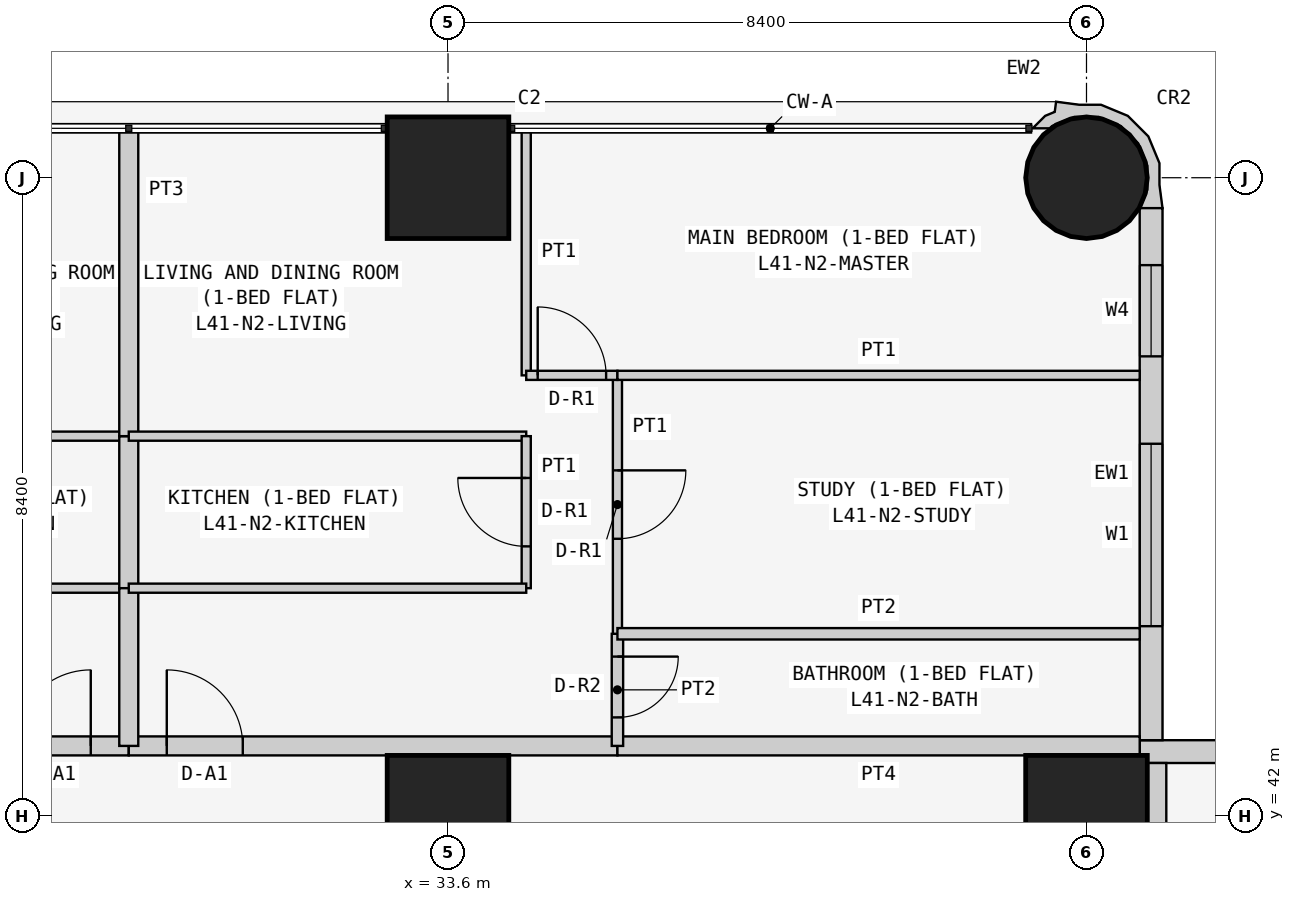
"""IFC4 building model, lengths in metres.
Left out: names, types, materials, properties, quantities, classifications, styles, units other than length and angle.
Written with IfcOpenShell. Run it as: python <this file> out.ifc"""

import sys

from ifc_helpers import new_model, si_unit, direction, frame, frame_2d, origin, origin_2d, place, context, subcontext, project, spatial, polyline, rectangle, circle, outline, extrude, element, fill, save


model = new_model("IFC4")
c1 = context("Model", 3, precision=1e-05, world=origin(), true_north=direction((0.0, 1.0)))
c2 = subcontext(c1, "Body", "Model", "MODEL_VIEW")
j1 = project(units=[si_unit("LENGTHUNIT", "METRE"), si_unit("PLANEANGLEUNIT", "RADIAN")], contexts=[c1])
p1 = place(None, origin())
s1 = spatial("IfcSite", under=j1, at=p1, CompositionType="ELEMENT")
p2 = place(p1, origin())
s2 = spatial("IfcBuilding", under=s1, at=p2, CompositionType="ELEMENT")
p3 = place(p2, frame((0.0, 0.0, 159.3)))
s3 = spatial("IfcBuildingStorey", under=s2, at=p3, CompositionType="ELEMENT", Elevation=159.3)
for number, where, z_axis, x_axis in (
    (1, (33.6, 42.0, 0.0), (0.0, 0.0, 1.0), (1.0, 0.0, 0.0)),
    (2, (33.6, 50.4, 0.0), (0.0, 0.0, 1.0), (1.0, 0.0, 0.0)),
    (3, (42.0, 42.0, 0.0), (0.0, 0.0, 1.0), (1.0, 0.0, 0.0)),
):
    element("IfcColumn", number, at=place(p3, frame(where, z_axis=z_axis, x_axis=x_axis)), inside=s3, PredefinedType="COLUMN", context=c2, shape_type="SweptSolid", body=[
        extrude(rectangle(XDim=1.6, YDim=1.6, at=origin_2d()), origin(), (0.0, 0.0, 1.0), 3.6),
    ])
p4 = place(p3, frame((42.0, 50.4, 0.0), z_axis=(0.0, 0.0, 1.0), x_axis=(1.0, 0.0, 0.0)))
e4 = element("IfcColumn", 4, at=p4, inside=s3, PredefinedType="COLUMN", context=c2, shape_type="SweptSolid", body=[
    extrude(circle(Radius=0.8, at=origin_2d()), origin(), (0.0, 0.0, 1.0), 3.6),
])
p5 = place(p3, frame((58.4, 42.85, 0.0), z_axis=(0.0, 0.0, 1.0), x_axis=(-1.0, 0.0, 0.0)))
e5 = element("IfcWall", 5, at=p5, inside=s3, PredefinedType="SOLIDWALL", context=c2, shape_type="SweptSolid", body=[
    extrude(rectangle(XDim=15.7, YDim=0.3, at=frame_2d((7.85, 0.0))), origin(), (0.0, 0.0, 1.0), 3.45),
])
p6 = place(p5, frame((12.4, 0.0, 0.9)))
e6 = element("IfcOpeningElement", 6, at=p6, cuts=e5, PredefinedType="OPENING", context=c2, shape_type="SweptSolid", body=[
    extrude(rectangle(XDim=1.8, YDim=1.5, at=frame_2d((0.9, 0.75))), frame((0.0, 0.16, 0.0), z_axis=(0.0, -1.0, 0.0), x_axis=(1.0, 0.0, 0.0)), (0.0, 0.0, 1.0), 0.32),
])
p7 = place(p5, frame((9.55, 0.0, 1.5)))
e7 = element("IfcOpeningElement", 7, at=p7, cuts=e5, PredefinedType="OPENING", context=c2, shape_type="SweptSolid", body=[
    extrude(rectangle(XDim=0.9, YDim=0.7, at=frame_2d((0.45, 0.35))), frame((0.0, 0.16, 0.0), z_axis=(0.0, -1.0, 0.0), x_axis=(1.0, 0.0, 0.0)), (0.0, 0.0, 1.0), 0.32),
])
p8 = place(p5, frame((5.1, 0.0, 0.9)))
e8 = element("IfcOpeningElement", 8, at=p8, cuts=e5, PredefinedType="OPENING", context=c2, shape_type="SweptSolid", body=[
    extrude(rectangle(XDim=1.8, YDim=1.5, at=frame_2d((0.9, 0.75))), frame((0.0, 0.16, 0.0), z_axis=(0.0, -1.0, 0.0), x_axis=(1.0, 0.0, 0.0)), (0.0, 0.0, 1.0), 0.32),
])
p9 = place(p5, frame((2.0, 0.0, 0.0)))
e9 = element("IfcOpeningElement", 9, at=p9, cuts=e5, PredefinedType="OPENING", context=c2, shape_type="SweptSolid", body=[
    extrude(rectangle(XDim=0.9, YDim=2.4, at=frame_2d((0.45, 1.2))), frame((0.0, 0.16, 0.0), z_axis=(0.0, -1.0, 0.0), x_axis=(1.0, 0.0, 0.0)), (0.0, 0.0, 1.0), 0.32),
])
p10 = place(p5, frame((0.7, 0.0, 0.9)))
e10 = element("IfcOpeningElement", 10, at=p10, cuts=e5, PredefinedType="OPENING", context=c2, shape_type="SweptSolid", body=[
    extrude(rectangle(XDim=1.2, YDim=1.5, at=frame_2d((0.6, 0.75))), frame((0.0, 0.16, 0.0), z_axis=(0.0, -1.0, 0.0), x_axis=(1.0, 0.0, 0.0)), (0.0, 0.0, 1.0), 0.32),
])
p11 = place(p3, frame((42.85, 43.0, 0.0), z_axis=(0.0, 0.0, 1.0), x_axis=(0.0, 1.0, 0.0)))
e11 = element("IfcWall", 11, at=p11, inside=s3, PredefinedType="SOLIDWALL", context=c2, shape_type="SweptSolid", body=[
    extrude(rectangle(XDim=7.0, YDim=0.3, at=frame_2d((3.5, 0.0))), origin(), (0.0, 0.0, 1.0), 3.45),
])
p12 = place(p11, frame((1.5, 0.0, 0.9)))
e12 = element("IfcOpeningElement", 12, at=p12, cuts=e11, PredefinedType="OPENING", context=c2, shape_type="SweptSolid", body=[
    extrude(rectangle(XDim=2.4, YDim=1.5, at=frame_2d((1.2, 0.75))), frame((0.0, 0.16, 0.0), z_axis=(0.0, -1.0, 0.0), x_axis=(1.0, 0.0, 0.0)), (0.0, 0.0, 1.0), 0.32),
])
p13 = place(p11, frame((5.05, 0.0, 0.9)))
e13 = element("IfcOpeningElement", 13, at=p13, cuts=e11, PredefinedType="OPENING", context=c2, shape_type="SweptSolid", body=[
    extrude(rectangle(XDim=1.2, YDim=1.5, at=frame_2d((0.6, 0.75))), frame((0.0, 0.16, 0.0), z_axis=(0.0, -1.0, 0.0), x_axis=(1.0, 0.0, 0.0)), (0.0, 0.0, 1.0), 0.32),
])
p14 = place(p3, frame((42.817, 50.073, 0.0), z_axis=(0.0, 0.0, 1.0), x_axis=(0.343276641956, 0.93923434088, 0.0)))
e14 = element("IfcWall", 14, at=p14, inside=s3, PredefinedType="SOLIDWALL", context=c2, shape_type="SweptSolid", body=[
    extrude(outline(polyline([(0.266, -0.055), (0.535, 0.044), (0.817, 0.302), (0.978, 0.648), (0.994, 1.03), (0.895, 1.3), (0.828, 1.598), (0.697, 1.569), (0.604, 1.67), (0.394, 1.767), (0.471, 1.556), (0.509, 1.539), (0.724, 1.304), (0.833, 1.005), (0.82, 0.687), (0.686, 0.397), (0.451, 0.182), (0.152, 0.073), (-0.116, 0.084), (-0.128, 0.078), (-0.146, 0.071), (-0.006, -0.197), (0.266, -0.055)])), origin(), (0.0, 0.0, 1.0), 3.45),
])
p15 = place(p3, frame((22.971, 42.925, 0.0), z_axis=(0.0, 0.0, 1.0), x_axis=(1.0, 0.0, 0.0)))
e15 = element("IfcWall", 15, at=p15, inside=s3, PredefinedType="PARTITIONING", context=c2, shape_type="SweptSolid", body=[
    extrude(rectangle(XDim=6.429, YDim=0.25, at=frame_2d((3.214, 0.0))), origin(), (0.0, 0.0, 1.0), 3.45),
])
p16 = place(p15, frame((4.929, 0.0, 0.0)))
e16 = element("IfcOpeningElement", 16, at=p16, cuts=e15, PredefinedType="OPENING", context=c2, shape_type="SweptSolid", body=[
    extrude(rectangle(XDim=1.0, YDim=2.1, at=frame_2d((0.5, 1.05))), frame((0.0, 0.135, 0.0), z_axis=(0.0, -1.0, 0.0), x_axis=(1.0, 0.0, 0.0)), (0.0, 0.0, 1.0), 0.27),
])
p17 = place(p3, frame((29.4, 42.925, 0.0), z_axis=(0.0, 0.0, 1.0), x_axis=(1.0, 0.0, 0.0)))
e17 = element("IfcWall", 17, at=p17, inside=s3, PredefinedType="PARTITIONING", context=c2, shape_type="SweptSolid", body=[
    extrude(rectangle(XDim=6.429, YDim=0.25, at=frame_2d((3.215, 0.0))), origin(), (0.0, 0.0, 1.0), 3.45),
])
p18 = place(p17, frame((0.5, 0.0, 0.0)))
e18 = element("IfcOpeningElement", 18, at=p18, cuts=e17, PredefinedType="OPENING", context=c2, shape_type="SweptSolid", body=[
    extrude(rectangle(XDim=1.0, YDim=2.1, at=frame_2d((0.5, 1.05))), frame((0.0, 0.135, 0.0), z_axis=(0.0, -1.0, 0.0), x_axis=(1.0, 0.0, 0.0)), (0.0, 0.0, 1.0), 0.27),
])
p19 = place(p3, frame((35.829, 42.925, 0.0), z_axis=(0.0, 0.0, 1.0), x_axis=(1.0, 0.0, 0.0)))
e19 = element("IfcWall", 19, at=p19, inside=s3, PredefinedType="PARTITIONING", context=c2, shape_type="SweptSolid", body=[
    extrude(rectangle(XDim=6.871, YDim=0.25, at=frame_2d((3.436, 0.0))), origin(), (0.0, 0.0, 1.0), 3.45),
])
p20 = place(p3, frame((42.925, 42.7, 0.0), z_axis=(0.0, 0.0, 1.0), x_axis=(0.0, -1.0, 0.0)))
e20 = element("IfcWall", 20, at=p20, inside=s3, PredefinedType="PARTITIONING", context=c2, shape_type="SweptSolid", body=[
    extrude(rectangle(XDim=6.471, YDim=0.25, at=frame_2d((3.235, 0.0))), origin(), (0.0, 0.0, 1.0), 3.45),
])
for number, where, z_axis, x_axis in (
    (21, (29.4, 47.0, 0.0), (0.0, 0.0, 1.0), (-1.0, 0.0, 0.0)),
    (22, (24.171, 45.0, 0.0), (0.0, 0.0, 1.0), (1.0, 0.0, 0.0)),
):
    element("IfcWall", number, at=place(p3, frame(where, z_axis=z_axis, x_axis=x_axis)), inside=s3, PredefinedType="PARTITIONING", context=c2, shape_type="SweptSolid", body=[
        extrude(rectangle(XDim=5.229, YDim=0.12, at=frame_2d((2.615, 0.0))), origin(), (0.0, 0.0, 1.0), 3.45),
    ])
p21 = place(p3, frame((29.4, 45.0, 0.0), z_axis=(0.0, 0.0, 1.0), x_axis=(0.0, 1.0, 0.0)))
e23 = element("IfcWall", 23, at=p21, inside=s3, PredefinedType="PARTITIONING", context=c2, shape_type="SweptSolid", body=[
    extrude(rectangle(XDim=2.0, YDim=0.25, at=frame_2d((1.0, 0.0))), origin(), (0.0, 0.0, 1.0), 2.848),
])
p22 = place(p3, frame((29.4, 45.0, 0.0), z_axis=(0.0, 0.0, 1.0), x_axis=(0.0, -1.0, 0.0)))
e24 = element("IfcWall", 24, at=p22, inside=s3, PredefinedType="PARTITIONING", context=c2, shape_type="SweptSolid", body=[
    extrude(rectangle(XDim=2.075, YDim=0.25, at=frame_2d((1.038, 0.0))), origin(), (0.0, 0.0, 1.0), 2.848),
])
p23 = place(p3, frame((29.4, 51.05, 0.0), z_axis=(0.0, 0.0, 1.0), x_axis=(0.0, -1.0, 0.0)))
e25 = element("IfcWall", 25, at=p23, inside=s3, PredefinedType="PARTITIONING", context=c2, shape_type="SweptSolid", body=[
    extrude(rectangle(XDim=4.05, YDim=0.25, at=frame_2d((2.025, 0.0))), origin(), (0.0, 0.0, 1.0), 2.848),
])
p24 = place(p3, frame((29.4, 47.0, 0.0), z_axis=(0.0, 0.0, 1.0), x_axis=(1.0, 0.0, 0.0)))
e26 = element("IfcWall", 26, at=p24, inside=s3, PredefinedType="PARTITIONING", context=c2, shape_type="SweptSolid", body=[
    extrude(rectangle(XDim=5.229, YDim=0.12, at=frame_2d((2.615, 0.0))), origin(), (0.0, 0.0, 1.0), 3.45),
])
p25 = place(p3, frame((34.629, 47.0, 0.0), z_axis=(0.0, 0.0, 1.0), x_axis=(0.0, -1.0, 0.0)))
e27 = element("IfcWall", 27, at=p25, inside=s3, PredefinedType="PARTITIONING", context=c2, shape_type="SweptSolid", body=[
    extrude(rectangle(XDim=2.0, YDim=0.12, at=frame_2d((1.0, 0.0))), origin(), (0.0, 0.0, 1.0), 3.45),
])
p26 = place(p25, frame((0.55, 0.0, 0.0)))
e28 = element("IfcOpeningElement", 28, at=p26, cuts=e27, PredefinedType="OPENING", context=c2, shape_type="SweptSolid", body=[
    extrude(rectangle(XDim=0.9, YDim=2.1, at=frame_2d((0.45, 1.05))), frame((0.0, 0.07, 0.0), z_axis=(0.0, -1.0, 0.0), x_axis=(1.0, 0.0, 0.0)), (0.0, 0.0, 1.0), 0.14),
])
p27 = place(p3, frame((34.629, 45.0, 0.0), z_axis=(0.0, 0.0, 1.0), x_axis=(-1.0, 0.0, 0.0)))
e29 = element("IfcWall", 29, at=p27, inside=s3, PredefinedType="PARTITIONING", context=c2, shape_type="SweptSolid", body=[
    extrude(rectangle(XDim=5.229, YDim=0.12, at=frame_2d((2.615, 0.0))), origin(), (0.0, 0.0, 1.0), 3.45),
])
p28 = place(p3, frame((35.829, 44.4, 0.0), z_axis=(0.0, 0.0, 1.0), x_axis=(0.0, -1.0, 0.0)))
e30 = element("IfcWall", 30, at=p28, inside=s3, PredefinedType="PARTITIONING", context=c2, shape_type="SweptSolid", body=[
    extrude(rectangle(XDim=1.475, YDim=0.15, at=frame_2d((0.737, 0.0))), origin(), (0.0, 0.0, 1.0), 3.45),
])
p29 = place(p28, frame((0.3, 0.0, 0.0)))
e31 = element("IfcOpeningElement", 31, at=p29, cuts=e30, PredefinedType="OPENING", context=c2, shape_type="SweptSolid", body=[
    extrude(rectangle(XDim=0.8, YDim=2.1, at=frame_2d((0.4, 1.05))), frame((0.0, 0.085, 0.0), z_axis=(0.0, -1.0, 0.0), x_axis=(1.0, 0.0, 0.0)), (0.0, 0.0, 1.0), 0.17),
])
p30 = place(p3, frame((35.829, 47.8, 0.0), z_axis=(0.0, 0.0, 1.0), x_axis=(0.0, -1.0, 0.0)))
e32 = element("IfcWall", 32, at=p30, inside=s3, PredefinedType="PARTITIONING", context=c2, shape_type="SweptSolid", body=[
    extrude(rectangle(XDim=3.4, YDim=0.12, at=frame_2d((1.7, 0.0))), origin(), (0.0, 0.0, 1.0), 3.45),
])
p31 = place(p30, frame((1.25, 0.0, 0.0)))
e33 = element("IfcOpeningElement", 33, at=p31, cuts=e32, PredefinedType="OPENING", context=c2, shape_type="SweptSolid", body=[
    extrude(rectangle(XDim=0.9, YDim=2.1, at=frame_2d((0.45, 1.05))), frame((0.0, 0.07, 0.0), z_axis=(0.0, -1.0, 0.0), x_axis=(1.0, 0.0, 0.0)), (0.0, 0.0, 1.0), 0.14),
])
p32 = place(p3, frame((34.629, 51.05, 0.0), z_axis=(0.0, 0.0, 1.0), x_axis=(0.0, -1.0, 0.0)))
e34 = element("IfcWall", 34, at=p32, inside=s3, PredefinedType="PARTITIONING", context=c2, shape_type="SweptSolid", body=[
    extrude(rectangle(XDim=3.25, YDim=0.12, at=frame_2d((1.625, 0.0))), origin(), (0.0, 0.0, 1.0), 3.45),
])
p33 = place(p3, frame((34.629, 47.8, 0.0), z_axis=(0.0, 0.0, 1.0), x_axis=(1.0, 0.0, 0.0)))
e35 = element("IfcWall", 35, at=p33, inside=s3, PredefinedType="PARTITIONING", context=c2, shape_type="SweptSolid", body=[
    extrude(rectangle(XDim=1.2, YDim=0.12, at=frame_2d((0.6, 0.0))), origin(), (0.0, 0.0, 1.0), 3.45),
])
p34 = place(p33, frame((0.151, 0.0, 0.0)))
e36 = element("IfcOpeningElement", 36, at=p34, cuts=e35, PredefinedType="OPENING", context=c2, shape_type="SweptSolid", body=[
    extrude(rectangle(XDim=0.9, YDim=2.1, at=frame_2d((0.45, 1.05))), frame((0.0, 0.07, 0.0), z_axis=(0.0, -1.0, 0.0), x_axis=(1.0, 0.0, 0.0)), (0.0, 0.0, 1.0), 0.14),
])
p35 = place(p3, frame((35.829, 44.4, 0.0), z_axis=(0.0, 0.0, 1.0), x_axis=(1.0, 0.0, 0.0)))
e37 = element("IfcWall", 37, at=p35, inside=s3, PredefinedType="PARTITIONING", context=c2, shape_type="SweptSolid", body=[
    extrude(rectangle(XDim=6.871, YDim=0.15, at=frame_2d((3.436, 0.0))), origin(), (0.0, 0.0, 1.0), 3.45),
])
p36 = place(p3, frame((35.829, 47.8, 0.0), z_axis=(0.0, 0.0, 1.0), x_axis=(1.0, 0.0, 0.0)))
e38 = element("IfcWall", 38, at=p36, inside=s3, PredefinedType="PARTITIONING", context=c2, shape_type="SweptSolid", body=[
    extrude(rectangle(XDim=6.871, YDim=0.12, at=frame_2d((3.436, 0.0))), origin(), (0.0, 0.0, 1.0), 3.45),
])
p37 = place(p12, origin())
e39 = element("IfcWindow", 39, at=p37, inside=s3, PartitioningType="SINGLE_PANEL", PredefinedType="WINDOW", context=c2, shape_type="SweptSolid", body=[
    extrude(rectangle(XDim=2.4, YDim=1.5, at=frame_2d((1.2, 0.75))), frame((0.0, 0.03, 0.0), z_axis=(0.0, -1.0, 0.0), x_axis=(1.0, 0.0, 0.0)), (0.0, 0.0, 1.0), 0.06),
])
fill(e12, e39)
p38 = place(p13, origin())
e40 = element("IfcWindow", 40, at=p38, inside=s3, PartitioningType="SINGLE_PANEL", PredefinedType="WINDOW", context=c2, shape_type="SweptSolid", body=[
    extrude(rectangle(XDim=1.2, YDim=1.5, at=frame_2d((0.6, 0.75))), frame((0.0, 0.03, 0.0), z_axis=(0.0, -1.0, 0.0), x_axis=(1.0, 0.0, 0.0)), (0.0, 0.0, 1.0), 0.06),
])
fill(e13, e40)
p39 = place(p16, origin())
e41 = element("IfcDoor", 41, at=p39, inside=s3, OperationType="SINGLE_SWING_RIGHT", PredefinedType="DOOR", context=c2, shape_type="SweptSolid", body=[
    extrude(rectangle(XDim=1.0, YDim=2.1, at=frame_2d((0.5, 1.05))), frame((0.0, 0.025, 0.0), z_axis=(0.0, -1.0, 0.0), x_axis=(1.0, 0.0, 0.0)), (0.0, 0.0, 1.0), 0.05),
])
fill(e16, e41)
p40 = place(p18, origin())
e42 = element("IfcDoor", 42, at=p40, inside=s3, OperationType="SINGLE_SWING_LEFT", PredefinedType="DOOR", context=c2, shape_type="SweptSolid", body=[
    extrude(rectangle(XDim=1.0, YDim=2.1, at=frame_2d((0.5, 1.05))), frame((0.0, 0.025, 0.0), z_axis=(0.0, -1.0, 0.0), x_axis=(1.0, 0.0, 0.0)), (0.0, 0.0, 1.0), 0.05),
])
fill(e18, e42)
p41 = place(p26, frame((0.9, 0.0, 0.0), z_axis=(0.0, 0.0, 1.0), x_axis=(-1.0, 0.0, 0.0)))
e43 = element("IfcDoor", 43, at=p41, inside=s3, OperationType="SINGLE_SWING_RIGHT", PredefinedType="DOOR", context=c2, shape_type="SweptSolid", body=[
    extrude(rectangle(XDim=0.9, YDim=2.1, at=frame_2d((0.45, 1.05))), frame((0.0, 0.025, 0.0), z_axis=(0.0, -1.0, 0.0), x_axis=(1.0, 0.0, 0.0)), (0.0, 0.0, 1.0), 0.05),
])
fill(e28, e43)
p42 = place(p29, origin())
e44 = element("IfcDoor", 44, at=p42, inside=s3, OperationType="SINGLE_SWING_LEFT", PredefinedType="DOOR", context=c2, shape_type="SweptSolid", body=[
    extrude(rectangle(XDim=0.8, YDim=2.1, at=frame_2d((0.4, 1.05))), frame((0.0, 0.025, 0.0), z_axis=(0.0, -1.0, 0.0), x_axis=(1.0, 0.0, 0.0)), (0.0, 0.0, 1.0), 0.05),
])
fill(e31, e44)
p43 = place(p31, origin())
e45 = element("IfcDoor", 45, at=p43, inside=s3, OperationType="SINGLE_SWING_LEFT", PredefinedType="DOOR", context=c2, shape_type="SweptSolid", body=[
    extrude(rectangle(XDim=0.9, YDim=2.1, at=frame_2d((0.45, 1.05))), frame((0.0, 0.025, 0.0), z_axis=(0.0, -1.0, 0.0), x_axis=(1.0, 0.0, 0.0)), (0.0, 0.0, 1.0), 0.05),
])
fill(e33, e45)
p44 = place(p34, origin())
e46 = element("IfcDoor", 46, at=p44, inside=s3, OperationType="SINGLE_SWING_LEFT", PredefinedType="DOOR", context=c2, shape_type="SweptSolid", body=[
    extrude(rectangle(XDim=0.9, YDim=2.1, at=frame_2d((0.45, 1.05))), frame((0.0, 0.025, 0.0), z_axis=(0.0, -1.0, 0.0), x_axis=(1.0, 0.0, 0.0)), (0.0, 0.0, 1.0), 0.05),
])
fill(e36, e46)
save(model, sys.argv[1])
